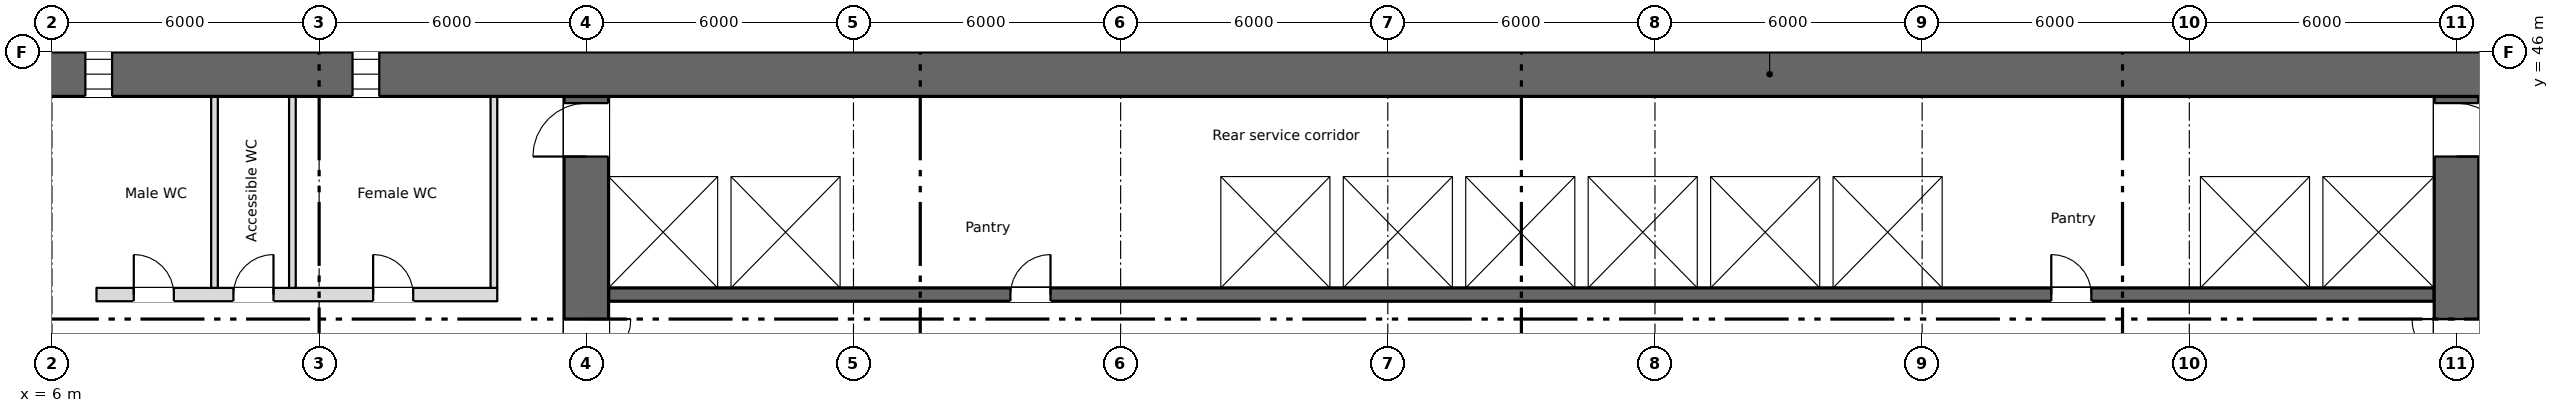
"""IFC4 building model, lengths in metres.
Left out: names, types, materials, properties, quantities, classifications, styles, units other than length and angle.
Written with IfcOpenShell. Run it as: python <this file> out.ifc"""

import sys

from ifc_helpers import new_model, si_unit, direction, frame, frame_2d, origin, place, context, subcontext, project, spatial, rectangle, extrude, element, fill, save


model = new_model("IFC4")
c1 = context("Model", 3, precision=1e-05, world=origin(), true_north=direction((0.0, 1.0)))
c2 = subcontext(c1, "Body", "Model", "MODEL_VIEW")
j1 = project(units=[si_unit("LENGTHUNIT", "METRE"), si_unit("PLANEANGLEUNIT", "RADIAN")], contexts=[c1])
p1 = place(None, origin())
s1 = spatial("IfcSite", under=j1, at=p1, CompositionType="ELEMENT")
p2 = place(p1, origin())
s2 = spatial("IfcBuilding", under=s1, at=p2, CompositionType="ELEMENT")
p3 = place(p2, frame((0.0, 0.0, 86.25)))
s3 = spatial("IfcBuildingStorey", under=s2, at=p3, CompositionType="ELEMENT", Elevation=86.25)
p4 = place(p3, frame((5.55, 45.5, 0.0), z_axis=(0.0, 0.0, 1.0), x_axis=(1.0, 0.0, 0.0)))
e1 = element("IfcWall", 1, at=p4, inside=s3, PredefinedType="SHEAR", context=c2, shape_type="SweptSolid", body=[
    extrude(rectangle(XDim=66.9, YDim=1.0, at=frame_2d((33.45, 0.0))), origin(), (0.0, 0.0, 1.0), 3.15),
])
p5 = place(p4, frame((1.2, 0.0, 0.6)))
e2 = element("IfcOpeningElement", 2, at=p5, cuts=e1, PredefinedType="OPENING", context=c2, shape_type="SweptSolid", body=[
    extrude(rectangle(XDim=0.6, YDim=2.4, at=frame_2d((0.3, 1.2))), frame((0.0, 0.51, 0.0), z_axis=(0.0, -1.0, 0.0), x_axis=(1.0, 0.0, 0.0)), (0.0, 0.0, 1.0), 1.02),
])
p6 = place(p4, frame((7.2, 0.0, 0.6)))
e3 = element("IfcOpeningElement", 3, at=p6, cuts=e1, PredefinedType="OPENING", context=c2, shape_type="SweptSolid", body=[
    extrude(rectangle(XDim=0.6, YDim=2.4, at=frame_2d((0.3, 1.2))), frame((0.0, 0.51, 0.0), z_axis=(0.0, -1.0, 0.0), x_axis=(1.0, 0.0, 0.0)), (0.0, 0.0, 1.0), 1.02),
])
p7 = place(p4, frame((55.2, 0.0, 0.6)))
e4 = element("IfcOpeningElement", 4, at=p7, cuts=e1, PredefinedType="OPENING", context=c2, shape_type="SweptSolid", body=[
    extrude(rectangle(XDim=0.6, YDim=2.4, at=frame_2d((0.3, 1.2))), frame((0.0, 0.51, 0.0), z_axis=(0.0, -1.0, 0.0), x_axis=(1.0, 0.0, 0.0)), (0.0, 0.0, 1.0), 1.02),
])
p8 = place(p4, frame((61.2, 0.0, 0.6)))
e5 = element("IfcOpeningElement", 5, at=p8, cuts=e1, PredefinedType="OPENING", context=c2, shape_type="SweptSolid", body=[
    extrude(rectangle(XDim=0.6, YDim=2.4, at=frame_2d((0.3, 1.2))), frame((0.0, 0.51, 0.0), z_axis=(0.0, -1.0, 0.0), x_axis=(1.0, 0.0, 0.0)), (0.0, 0.0, 1.0), 1.02),
])
p9 = place(p3, frame((6.85, 28.4, 0.0), z_axis=(0.0, 0.0, 1.0), x_axis=(0.0, 1.0, 0.0)))
e6 = element("IfcWall", 6, at=p9, inside=s3, PredefinedType="SHEAR", context=c2, shape_type="SweptSolid", body=[
    extrude(rectangle(XDim=16.6, YDim=0.3, at=frame_2d((8.3, 0.0))), origin(), (0.0, 0.0, 1.0), 3.15),
])
p10 = place(p3, frame((18.0, 28.4, 0.0), z_axis=(0.0, 0.0, 1.0), x_axis=(0.0, 1.0, 0.0)))
e7 = element("IfcWall", 7, at=p10, inside=s3, PredefinedType="SHEAR", context=c2, shape_type="SweptSolid", body=[
    extrude(rectangle(XDim=16.6, YDim=1.0, at=frame_2d((8.3, 0.0))), origin(), (0.0, 0.0, 1.0), 3.15),
])
p11 = place(p10, frame((9.6, 0.0, 0.0)))
e8 = element("IfcOpeningElement", 8, at=p11, cuts=e7, PredefinedType="OPENING", context=c2, shape_type="SweptSolid", body=[
    extrude(rectangle(XDim=2.0, YDim=2.1, at=frame_2d((1.0, 1.05))), frame((0.0, 0.51, 0.0), z_axis=(0.0, -1.0, 0.0), x_axis=(1.0, 0.0, 0.0)), (0.0, 0.0, 1.0), 1.02),
])
p12 = place(p10, frame((15.25, 0.0, 0.0)))
e9 = element("IfcOpeningElement", 9, at=p12, cuts=e7, PredefinedType="OPENING", context=c2, shape_type="SweptSolid", body=[
    extrude(rectangle(XDim=1.2, YDim=2.1, at=frame_2d((0.6, 1.05))), frame((0.0, 0.51, 0.0), z_axis=(0.0, -1.0, 0.0), x_axis=(1.0, 0.0, 0.0)), (0.0, 0.0, 1.0), 1.02),
])
p13 = place(p3, frame((60.0, 28.4, 0.0), z_axis=(0.0, 0.0, 1.0), x_axis=(0.0, 1.0, 0.0)))
e10 = element("IfcWall", 10, at=p13, inside=s3, PredefinedType="SHEAR", context=c2, shape_type="SweptSolid", body=[
    extrude(rectangle(XDim=16.6, YDim=1.0, at=frame_2d((8.3, 0.0))), origin(), (0.0, 0.0, 1.0), 3.15),
])
p14 = place(p13, frame((9.6, 0.0, 0.0)))
e11 = element("IfcOpeningElement", 11, at=p14, cuts=e10, PredefinedType="OPENING", context=c2, shape_type="SweptSolid", body=[
    extrude(rectangle(XDim=2.0, YDim=2.1, at=frame_2d((1.0, 1.05))), frame((0.0, 0.51, 0.0), z_axis=(0.0, -1.0, 0.0), x_axis=(1.0, 0.0, 0.0)), (0.0, 0.0, 1.0), 1.02),
])
p15 = place(p13, frame((15.25, 0.0, 0.0)))
e12 = element("IfcOpeningElement", 12, at=p15, cuts=e10, PredefinedType="OPENING", context=c2, shape_type="SweptSolid", body=[
    extrude(rectangle(XDim=1.2, YDim=2.1, at=frame_2d((0.6, 1.05))), frame((0.0, 0.51, 0.0), z_axis=(0.0, -1.0, 0.0), x_axis=(1.0, 0.0, 0.0)), (0.0, 0.0, 1.0), 1.02),
])
p16 = place(p3, frame((18.5, 40.55, 0.0), z_axis=(0.0, 0.0, 1.0), x_axis=(1.0, 0.0, 0.0)))
e13 = element("IfcWall", 13, at=p16, inside=s3, PredefinedType="SHEAR", context=c2, shape_type="SweptSolid", body=[
    extrude(rectangle(XDim=41.0, YDim=0.3, at=frame_2d((20.5, 0.0))), origin(), (0.0, 0.0, 1.0), 3.15),
])
p17 = place(p16, frame((9.025, 0.0, 0.0)))
e14 = element("IfcOpeningElement", 14, at=p17, cuts=e13, PredefinedType="OPENING", context=c2, shape_type="SweptSolid", body=[
    extrude(rectangle(XDim=0.9, YDim=2.1, at=frame_2d((0.45, 1.05))), frame((0.0, 0.16, 0.0), z_axis=(0.0, -1.0, 0.0), x_axis=(1.0, 0.0, 0.0)), (0.0, 0.0, 1.0), 0.32),
])
p18 = place(p16, frame((32.4, 0.0, 0.0)))
e15 = element("IfcOpeningElement", 15, at=p18, cuts=e13, PredefinedType="OPENING", context=c2, shape_type="SweptSolid", body=[
    extrude(rectangle(XDim=0.9, YDim=2.1, at=frame_2d((0.45, 1.05))), frame((0.0, 0.16, 0.0), z_axis=(0.0, -1.0, 0.0), x_axis=(1.0, 0.0, 0.0)), (0.0, 0.0, 1.0), 0.32),
])
p19 = place(p16, frame((14.425, 0.0, 0.0)))
e16 = element("IfcOpeningElement", 16, at=p19, cuts=e13, PredefinedType="OPENING", context=c2, shape_type="SweptSolid", body=[
    extrude(rectangle(XDim=1.1, YDim=2.1, at=frame_2d((0.55, 1.05))), frame((0.0, 0.16, 0.0), z_axis=(0.0, -1.0, 0.0), x_axis=(1.0, 0.0, 0.0)), (0.0, 0.0, 1.0), 0.32),
])
p20 = place(p16, frame((17.175, 0.0, 0.0)))
e17 = element("IfcOpeningElement", 17, at=p20, cuts=e13, PredefinedType="OPENING", context=c2, shape_type="SweptSolid", body=[
    extrude(rectangle(XDim=1.1, YDim=2.1, at=frame_2d((0.55, 1.05))), frame((0.0, 0.16, 0.0), z_axis=(0.0, -1.0, 0.0), x_axis=(1.0, 0.0, 0.0)), (0.0, 0.0, 1.0), 0.32),
])
p21 = place(p16, frame((19.925, 0.0, 0.0)))
e18 = element("IfcOpeningElement", 18, at=p21, cuts=e13, PredefinedType="OPENING", context=c2, shape_type="SweptSolid", body=[
    extrude(rectangle(XDim=1.1, YDim=2.1, at=frame_2d((0.55, 1.05))), frame((0.0, 0.16, 0.0), z_axis=(0.0, -1.0, 0.0), x_axis=(1.0, 0.0, 0.0)), (0.0, 0.0, 1.0), 0.32),
])
p22 = place(p16, frame((22.675, 0.0, 0.0)))
e19 = element("IfcOpeningElement", 19, at=p22, cuts=e13, PredefinedType="OPENING", context=c2, shape_type="SweptSolid", body=[
    extrude(rectangle(XDim=1.1, YDim=2.1, at=frame_2d((0.55, 1.05))), frame((0.0, 0.16, 0.0), z_axis=(0.0, -1.0, 0.0), x_axis=(1.0, 0.0, 0.0)), (0.0, 0.0, 1.0), 0.32),
])
p23 = place(p16, frame((36.375, 0.0, 0.0)))
e20 = element("IfcOpeningElement", 20, at=p23, cuts=e13, PredefinedType="OPENING", context=c2, shape_type="SweptSolid", body=[
    extrude(rectangle(XDim=1.2, YDim=2.1, at=frame_2d((0.6, 1.05))), frame((0.0, 0.16, 0.0), z_axis=(0.0, -1.0, 0.0), x_axis=(1.0, 0.0, 0.0)), (0.0, 0.0, 1.0), 0.32),
])
p24 = place(p16, frame((39.15, 0.0, 0.0)))
e21 = element("IfcOpeningElement", 21, at=p24, cuts=e13, PredefinedType="OPENING", context=c2, shape_type="SweptSolid", body=[
    extrude(rectangle(XDim=1.2, YDim=2.1, at=frame_2d((0.6, 1.05))), frame((0.0, 0.16, 0.0), z_axis=(0.0, -1.0, 0.0), x_axis=(1.0, 0.0, 0.0)), (0.0, 0.0, 1.0), 0.32),
])
p25 = place(p3, frame((18.5, 43.35, 0.0), z_axis=(0.0, 0.0, 1.0), x_axis=(1.0, 0.0, 0.0)))
e22 = element("IfcWall", 22, at=p25, inside=s3, PredefinedType="SHEAR", context=c2, shape_type="SweptSolid", body=[
    extrude(rectangle(XDim=41.0, YDim=0.3, at=frame_2d((20.5, 0.0))), origin(), (0.0, 0.0, 1.0), 3.15),
])
p26 = place(p3, frame((7.0, 40.55, 0.0), z_axis=(0.0, 0.0, 1.0), x_axis=(1.0, 0.0, 0.0)))
e23 = element("IfcWall", 23, at=p26, inside=s3, PredefinedType="PARTITIONING", context=c2, shape_type="SweptSolid", body=[
    extrude(rectangle(XDim=9.0, YDim=0.3, at=frame_2d((4.5, 0.0))), origin(), (0.0, 0.0, 1.0), 3.15),
])
p27 = place(p26, frame((0.837, 0.0, 0.0)))
e24 = element("IfcOpeningElement", 24, at=p27, cuts=e23, PredefinedType="OPENING", context=c2, shape_type="SweptSolid", body=[
    extrude(rectangle(XDim=0.9, YDim=2.1, at=frame_2d((0.45, 1.05))), frame((0.0, 0.16, 0.0), z_axis=(0.0, -1.0, 0.0), x_axis=(1.0, 0.0, 0.0)), (0.0, 0.0, 1.0), 0.32),
])
p28 = place(p26, frame((3.075, 0.0, 0.0)))
e25 = element("IfcOpeningElement", 25, at=p28, cuts=e23, PredefinedType="OPENING", context=c2, shape_type="SweptSolid", body=[
    extrude(rectangle(XDim=0.9, YDim=2.1, at=frame_2d((0.45, 1.05))), frame((0.0, 0.16, 0.0), z_axis=(0.0, -1.0, 0.0), x_axis=(1.0, 0.0, 0.0)), (0.0, 0.0, 1.0), 0.32),
])
p29 = place(p26, frame((6.212, 0.0, 0.0)))
e26 = element("IfcOpeningElement", 26, at=p29, cuts=e23, PredefinedType="OPENING", context=c2, shape_type="SweptSolid", body=[
    extrude(rectangle(XDim=0.9, YDim=2.1, at=frame_2d((0.45, 1.05))), frame((0.0, 0.16, 0.0), z_axis=(0.0, -1.0, 0.0), x_axis=(1.0, 0.0, 0.0)), (0.0, 0.0, 1.0), 0.32),
])
for number, where, z_axis, x_axis in (
    (27, (21.1, 40.7, 0.0), (0.0, 0.0, 1.0), (0.0, 1.0, 0.0)),
    (28, (23.85, 40.7, 0.0), (0.0, 0.0, 1.0), (0.0, 1.0, 0.0)),
    (29, (32.1, 40.7, 0.0), (0.0, 0.0, 1.0), (0.0, 1.0, 0.0)),
    (30, (34.85, 40.7, 0.0), (0.0, 0.0, 1.0), (0.0, 1.0, 0.0)),
    (31, (37.6, 40.7, 0.0), (0.0, 0.0, 1.0), (0.0, 1.0, 0.0)),
    (32, (40.35, 40.7, 0.0), (0.0, 0.0, 1.0), (0.0, 1.0, 0.0)),
    (33, (43.1, 40.7, 0.0), (0.0, 0.0, 1.0), (0.0, 1.0, 0.0)),
    (34, (45.85, 40.7, 0.0), (0.0, 0.0, 1.0), (0.0, 1.0, 0.0)),
    (35, (48.6, 40.7, 0.0), (0.0, 0.0, 1.0), (0.0, 1.0, 0.0)),
    (36, (54.1, 40.7, 0.0), (0.0, 0.0, 1.0), (0.0, 1.0, 0.0)),
    (37, (56.85, 40.7, 0.0), (0.0, 0.0, 1.0), (0.0, 1.0, 0.0)),
):
    element("IfcWall", number, at=place(p3, frame(where, z_axis=z_axis, x_axis=x_axis)), inside=s3, PredefinedType="SHEAR", context=c2, shape_type="SweptSolid", body=[
        extrude(rectangle(XDim=2.5, YDim=0.3, at=frame_2d((1.25, 0.0))), origin(), (0.0, 0.0, 1.0), 3.15),
    ])
for number, where, z_axis, x_axis in (
    (38, (15.925, 40.7, 0.0), (0.0, 0.0, 1.0), (0.0, 1.0, 0.0)),
    (39, (9.65, 40.7, 0.0), (0.0, 0.0, 1.0), (0.0, 1.0, 0.0)),
    (40, (11.4, 40.7, 0.0), (0.0, 0.0, 1.0), (0.0, 1.0, 0.0)),
):
    element("IfcWall", number, at=place(p3, frame(where, z_axis=z_axis, x_axis=x_axis)), inside=s3, PredefinedType="PARTITIONING", context=c2, shape_type="SweptSolid", body=[
        extrude(rectangle(XDim=4.3, YDim=0.15, at=frame_2d((2.15, 0.0))), origin(), (0.0, 0.0, 1.0), 3.15),
    ])
p30 = place(p5, origin())
e41 = element("IfcWindow", 41, at=p30, inside=s3, PartitioningType="SINGLE_PANEL", PredefinedType="WINDOW", context=c2, shape_type="SweptSolid", body=[
    extrude(rectangle(XDim=0.6, YDim=2.4, at=frame_2d((0.3, 1.2))), frame((0.0, 0.03, 0.0), z_axis=(0.0, -1.0, 0.0), x_axis=(1.0, 0.0, 0.0)), (0.0, 0.0, 1.0), 0.06),
])
fill(e2, e41)
p31 = place(p6, origin())
e42 = element("IfcWindow", 42, at=p31, inside=s3, PartitioningType="SINGLE_PANEL", PredefinedType="WINDOW", context=c2, shape_type="SweptSolid", body=[
    extrude(rectangle(XDim=0.6, YDim=2.4, at=frame_2d((0.3, 1.2))), frame((0.0, 0.03, 0.0), z_axis=(0.0, -1.0, 0.0), x_axis=(1.0, 0.0, 0.0)), (0.0, 0.0, 1.0), 0.06),
])
fill(e3, e42)
p32 = place(p27, origin())
e43 = element("IfcDoor", 43, at=p32, inside=s3, OperationType="SINGLE_SWING_LEFT", PredefinedType="DOOR", context=c2, shape_type="SweptSolid", body=[
    extrude(rectangle(XDim=0.9, YDim=2.1, at=frame_2d((0.45, 1.05))), frame((0.0, 0.025, 0.0), z_axis=(0.0, -1.0, 0.0), x_axis=(1.0, 0.0, 0.0)), (0.0, 0.0, 1.0), 0.05),
])
fill(e24, e43)
p33 = place(p28, origin())
e44 = element("IfcDoor", 44, at=p33, inside=s3, OperationType="SINGLE_SWING_RIGHT", PredefinedType="DOOR", context=c2, shape_type="SweptSolid", body=[
    extrude(rectangle(XDim=0.9, YDim=2.1, at=frame_2d((0.45, 1.05))), frame((0.0, 0.025, 0.0), z_axis=(0.0, -1.0, 0.0), x_axis=(1.0, 0.0, 0.0)), (0.0, 0.0, 1.0), 0.05),
])
fill(e25, e44)
p34 = place(p29, origin())
e45 = element("IfcDoor", 45, at=p34, inside=s3, OperationType="SINGLE_SWING_LEFT", PredefinedType="DOOR", context=c2, shape_type="SweptSolid", body=[
    extrude(rectangle(XDim=0.9, YDim=2.1, at=frame_2d((0.45, 1.05))), frame((0.0, 0.025, 0.0), z_axis=(0.0, -1.0, 0.0), x_axis=(1.0, 0.0, 0.0)), (0.0, 0.0, 1.0), 0.05),
])
fill(e26, e45)
p35 = place(p17, origin())
e46 = element("IfcDoor", 46, at=p35, inside=s3, OperationType="SINGLE_SWING_RIGHT", PredefinedType="DOOR", context=c2, shape_type="SweptSolid", body=[
    extrude(rectangle(XDim=0.9, YDim=2.1, at=frame_2d((0.45, 1.05))), frame((0.0, 0.025, 0.0), z_axis=(0.0, -1.0, 0.0), x_axis=(1.0, 0.0, 0.0)), (0.0, 0.0, 1.0), 0.05),
])
fill(e14, e46)
p36 = place(p18, origin())
e47 = element("IfcDoor", 47, at=p36, inside=s3, OperationType="SINGLE_SWING_LEFT", PredefinedType="DOOR", context=c2, shape_type="SweptSolid", body=[
    extrude(rectangle(XDim=0.9, YDim=2.1, at=frame_2d((0.45, 1.05))), frame((0.0, 0.025, 0.0), z_axis=(0.0, -1.0, 0.0), x_axis=(1.0, 0.0, 0.0)), (0.0, 0.0, 1.0), 0.05),
])
fill(e15, e47)
p37 = place(p19, origin())
e48 = element("IfcDoor", 48, at=p37, inside=s3, OperationType="SLIDING_TO_LEFT", PredefinedType="DOOR", context=c2, shape_type="SweptSolid", body=[
    extrude(rectangle(XDim=1.1, YDim=2.1, at=frame_2d((0.55, 1.05))), frame((0.0, 0.025, 0.0), z_axis=(0.0, -1.0, 0.0), x_axis=(1.0, 0.0, 0.0)), (0.0, 0.0, 1.0), 0.05),
])
fill(e16, e48)
p38 = place(p20, origin())
e49 = element("IfcDoor", 49, at=p38, inside=s3, OperationType="SLIDING_TO_LEFT", PredefinedType="DOOR", context=c2, shape_type="SweptSolid", body=[
    extrude(rectangle(XDim=1.1, YDim=2.1, at=frame_2d((0.55, 1.05))), frame((0.0, 0.025, 0.0), z_axis=(0.0, -1.0, 0.0), x_axis=(1.0, 0.0, 0.0)), (0.0, 0.0, 1.0), 0.05),
])
fill(e17, e49)
p39 = place(p21, origin())
e50 = element("IfcDoor", 50, at=p39, inside=s3, OperationType="SLIDING_TO_LEFT", PredefinedType="DOOR", context=c2, shape_type="SweptSolid", body=[
    extrude(rectangle(XDim=1.1, YDim=2.1, at=frame_2d((0.55, 1.05))), frame((0.0, 0.025, 0.0), z_axis=(0.0, -1.0, 0.0), x_axis=(1.0, 0.0, 0.0)), (0.0, 0.0, 1.0), 0.05),
])
fill(e18, e50)
p40 = place(p22, origin())
e51 = element("IfcDoor", 51, at=p40, inside=s3, OperationType="SLIDING_TO_LEFT", PredefinedType="DOOR", context=c2, shape_type="SweptSolid", body=[
    extrude(rectangle(XDim=1.1, YDim=2.1, at=frame_2d((0.55, 1.05))), frame((0.0, 0.025, 0.0), z_axis=(0.0, -1.0, 0.0), x_axis=(1.0, 0.0, 0.0)), (0.0, 0.0, 1.0), 0.05),
])
fill(e19, e51)
p41 = place(p23, origin())
e52 = element("IfcDoor", 52, at=p41, inside=s3, OperationType="SLIDING_TO_LEFT", PredefinedType="DOOR", context=c2, shape_type="SweptSolid", body=[
    extrude(rectangle(XDim=1.2, YDim=2.1, at=frame_2d((0.6, 1.05))), frame((0.0, 0.025, 0.0), z_axis=(0.0, -1.0, 0.0), x_axis=(1.0, 0.0, 0.0)), (0.0, 0.0, 1.0), 0.05),
])
fill(e20, e52)
p42 = place(p24, origin())
e53 = element("IfcDoor", 53, at=p42, inside=s3, OperationType="SLIDING_TO_LEFT", PredefinedType="DOOR", context=c2, shape_type="SweptSolid", body=[
    extrude(rectangle(XDim=1.2, YDim=2.1, at=frame_2d((0.6, 1.05))), frame((0.0, 0.025, 0.0), z_axis=(0.0, -1.0, 0.0), x_axis=(1.0, 0.0, 0.0)), (0.0, 0.0, 1.0), 0.05),
])
fill(e21, e53)
p43 = place(p11, origin())
e54 = element("IfcDoor", 54, at=p43, inside=s3, OperationType="DOUBLE_DOOR_SINGLE_SWING", PredefinedType="DOOR", context=c2, shape_type="SweptSolid", body=[
    extrude(rectangle(XDim=2.0, YDim=2.1, at=frame_2d((1.0, 1.05))), frame((0.0, 0.025, 0.0), z_axis=(0.0, -1.0, 0.0), x_axis=(1.0, 0.0, 0.0)), (0.0, 0.0, 1.0), 0.05),
])
fill(e8, e54)
p44 = place(p14, origin())
e55 = element("IfcDoor", 55, at=p44, inside=s3, OperationType="DOUBLE_DOOR_SINGLE_SWING", PredefinedType="DOOR", context=c2, shape_type="SweptSolid", body=[
    extrude(rectangle(XDim=2.0, YDim=2.1, at=frame_2d((1.0, 1.05))), frame((0.0, 0.025, 0.0), z_axis=(0.0, -1.0, 0.0), x_axis=(1.0, 0.0, 0.0)), (0.0, 0.0, 1.0), 0.05),
])
fill(e11, e55)
p45 = place(p12, origin())
e56 = element("IfcDoor", 56, at=p45, inside=s3, OperationType="SINGLE_SWING_LEFT", PredefinedType="DOOR", context=c2, shape_type="SweptSolid", body=[
    extrude(rectangle(XDim=1.2, YDim=2.1, at=frame_2d((0.6, 1.05))), frame((0.0, 0.025, 0.0), z_axis=(0.0, -1.0, 0.0), x_axis=(1.0, 0.0, 0.0)), (0.0, 0.0, 1.0), 0.05),
])
fill(e9, e56)
p46 = place(p15, origin())
e57 = element("IfcDoor", 57, at=p46, inside=s3, OperationType="SINGLE_SWING_LEFT", PredefinedType="DOOR", context=c2, shape_type="SweptSolid", body=[
    extrude(rectangle(XDim=1.2, YDim=2.1, at=frame_2d((0.6, 1.05))), frame((0.0, 0.025, 0.0), z_axis=(0.0, -1.0, 0.0), x_axis=(1.0, 0.0, 0.0)), (0.0, 0.0, 1.0), 0.05),
])
fill(e12, e57)
save(model, sys.argv[1])
